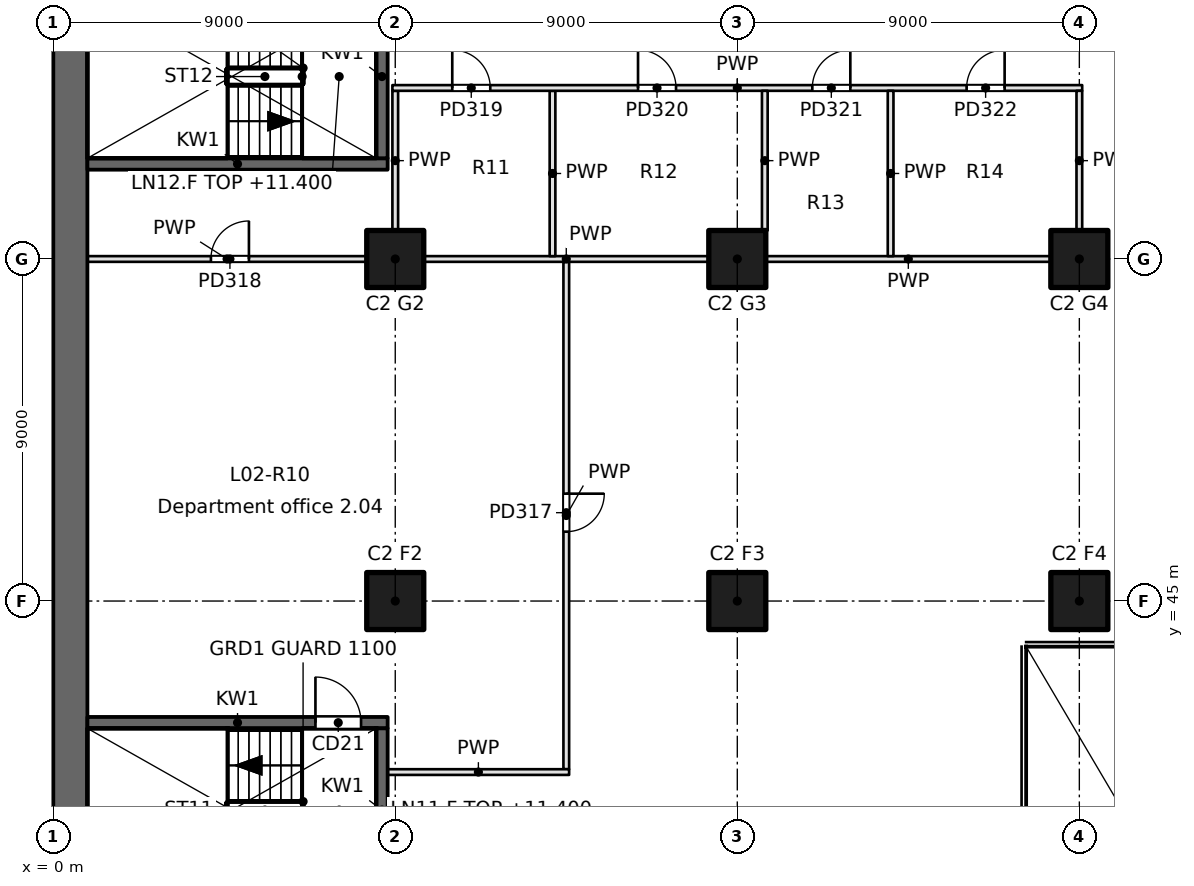
"""IFC4 building model, lengths in metres.
Left out: names, types, materials, properties, quantities, classifications, styles, units other than length and angle.
Written with IfcOpenShell. Run it as: python <this file> out.ifc"""

import sys

from ifc_helpers import new_model, si_unit, direction, frame, frame_2d, origin, origin_2d, place, context, subcontext, project, spatial, rectangle, extrude, element, fill, save


model = new_model("IFC4")
c1 = context("Model", 3, precision=1e-05, world=origin(), true_north=direction((0.0, 1.0)))
c2 = subcontext(c1, "Body", "Model", "MODEL_VIEW")
j1 = project(units=[si_unit("LENGTHUNIT", "METRE"), si_unit("PLANEANGLEUNIT", "RADIAN")], contexts=[c1])
p1 = place(None, origin())
s1 = spatial("IfcSite", under=j1, at=p1, CompositionType="ELEMENT")
p2 = place(p1, origin())
s2 = spatial("IfcBuilding", under=s1, at=p2, CompositionType="ELEMENT")
p3 = place(p2, frame((0.0, 0.0, 11.4)))
s3 = spatial("IfcBuildingStorey", under=s2, at=p3, CompositionType="ELEMENT", Elevation=11.4)
for number, where, z_axis, x_axis in (
    (1, (9.0, 45.0, 0.0), (0.0, 0.0, 1.0), (1.0, 0.0, 0.0)),
    (2, (9.0, 54.0, 0.0), (0.0, 0.0, 1.0), (1.0, 0.0, 0.0)),
    (3, (18.0, 45.0, 0.0), (0.0, 0.0, 1.0), (1.0, 0.0, 0.0)),
    (4, (18.0, 54.0, 0.0), (0.0, 0.0, 1.0), (1.0, 0.0, 0.0)),
    (5, (27.0, 45.0, 0.0), (0.0, 0.0, 1.0), (1.0, 0.0, 0.0)),
    (6, (27.0, 54.0, 0.0), (0.0, 0.0, 1.0), (1.0, 0.0, 0.0)),
):
    element("IfcColumn", number, at=place(p3, frame(where, z_axis=z_axis, x_axis=x_axis)), inside=s3, PredefinedType="COLUMN", context=c2, shape_type="SweptSolid", body=[
        extrude(rectangle(XDim=1.5, YDim=1.5, at=origin_2d()), origin(), (0.0, 0.0, 1.0), 5.4),
    ])
p4 = place(p3, frame((0.45, 94.5, 0.0), z_axis=(0.0, 0.0, 1.0), x_axis=(0.0, -1.0, 0.0)))
e7 = element("IfcWall", 7, at=p4, inside=s3, PredefinedType="SHEAR", context=c2, shape_type="SweptSolid", body=[
    extrude(rectangle(XDim=66.085, YDim=0.9, at=frame_2d((33.042, 0.0))), origin(), (0.0, 0.0, 1.0), 5.4),
])
p5 = place(p3, frame((0.9, 41.8, -0.35), z_axis=(0.0, 0.0, 1.0), x_axis=(1.0, 0.0, 0.0)))
e8 = element("IfcWall", 8, at=p5, inside=s3, PredefinedType="SOLIDWALL", context=c2, shape_type="SweptSolid", body=[
    extrude(rectangle(XDim=7.9, YDim=0.3, at=frame_2d((3.95, 0.0))), origin(), (0.0, 0.0, 1.0), 5.4),
])
p6 = place(p5, frame((6.0, 0.0, 0.35)))
e9 = element("IfcOpeningElement", 9, at=p6, cuts=e8, PredefinedType="OPENING", context=c2, shape_type="SweptSolid", body=[
    extrude(rectangle(XDim=1.2, YDim=2.1, at=frame_2d((0.6, 1.05))), frame((0.0, 0.15, 0.0), z_axis=(0.0, -1.0, 0.0), x_axis=(1.0, 0.0, 0.0)), (0.0, 0.0, 1.0), 0.3),
])
p7 = place(p3, frame((0.9, 56.5, -0.35), z_axis=(0.0, 0.0, 1.0), x_axis=(1.0, 0.0, 0.0)))
e10 = element("IfcWall", 10, at=p7, inside=s3, PredefinedType="SOLIDWALL", context=c2, shape_type="SweptSolid", body=[
    extrude(rectangle(XDim=7.9, YDim=0.3, at=frame_2d((3.95, 0.0))), origin(), (0.0, 0.0, 1.0), 5.4),
])
p8 = place(p3, frame((8.65, 37.35, -0.35), z_axis=(0.0, 0.0, 1.0), x_axis=(0.0, 1.0, 0.0)))
e11 = element("IfcWall", 11, at=p8, inside=s3, PredefinedType="SOLIDWALL", context=c2, shape_type="SweptSolid", body=[
    extrude(rectangle(XDim=4.3, YDim=0.3, at=frame_2d((2.15, 0.0))), origin(), (0.0, 0.0, 1.0), 5.4),
])
p9 = place(p3, frame((8.65, 56.65, -0.35), z_axis=(0.0, 0.0, 1.0), x_axis=(0.0, 1.0, 0.0)))
e12 = element("IfcWall", 12, at=p9, inside=s3, PredefinedType="SOLIDWALL", context=c2, shape_type="SweptSolid", body=[
    extrude(rectangle(XDim=4.3, YDim=0.3, at=frame_2d((2.15, 0.0))), origin(), (0.0, 0.0, 1.0), 5.4),
])
p10 = place(p3, frame((0.9, 54.0, 0.0), z_axis=(0.0, 0.0, 1.0), x_axis=(1.0, 0.0, 0.0)))
e13 = element("IfcWall", 13, at=p10, inside=s3, PredefinedType="PARTITIONING", context=c2, shape_type="SweptSolid", body=[
    extrude(rectangle(XDim=7.35, YDim=0.15, at=frame_2d((3.675, 0.0))), origin(), (0.0, 0.0, 1.0), 5.05),
])
p11 = place(p10, frame((3.25, 0.0, 0.0)))
e14 = element("IfcOpeningElement", 14, at=p11, cuts=e13, PredefinedType="OPENING", context=c2, shape_type="SweptSolid", body=[
    extrude(rectangle(XDim=1.0, YDim=2.1, at=frame_2d((0.5, 1.05))), frame((0.0, 0.075, 0.0), z_axis=(0.0, -1.0, 0.0), x_axis=(1.0, 0.0, 0.0)), (0.0, 0.0, 1.0), 0.15),
])
for number, where, z_axis, x_axis in (
    (15, (9.75, 54.0, 0.0), (0.0, 0.0, 1.0), (1.0, 0.0, 0.0)),
    (16, (26.25, 54.0, 0.0), (0.0, 0.0, 1.0), (-1.0, 0.0, 0.0)),
):
    element("IfcWall", number, at=place(p3, frame(where, z_axis=z_axis, x_axis=x_axis)), inside=s3, PredefinedType="PARTITIONING", context=c2, shape_type="SweptSolid", body=[
        extrude(rectangle(XDim=7.5, YDim=0.15, at=frame_2d((3.75, 0.0))), origin(), (0.0, 0.0, 1.0), 5.05),
    ])
p12 = place(p3, frame((13.5, 53.925, 0.0), z_axis=(0.0, 0.0, 1.0), x_axis=(0.0, -1.0, 0.0)))
e17 = element("IfcWall", 17, at=p12, inside=s3, PredefinedType="PARTITIONING", context=c2, shape_type="SweptSolid", body=[
    extrude(rectangle(XDim=13.35, YDim=0.15, at=frame_2d((6.675, 0.0))), origin(), (0.0, 0.0, 1.0), 5.05),
])
p13 = place(p12, frame((6.1, 0.0, 0.0)))
e18 = element("IfcOpeningElement", 18, at=p13, cuts=e17, PredefinedType="OPENING", context=c2, shape_type="SweptSolid", body=[
    extrude(rectangle(XDim=1.0, YDim=2.1, at=frame_2d((0.5, 1.05))), frame((0.0, 0.075, 0.0), z_axis=(0.0, -1.0, 0.0), x_axis=(1.0, 0.0, 0.0)), (0.0, 0.0, 1.0), 0.15),
])
p14 = place(p3, frame((13.575, 40.5, 0.0), z_axis=(0.0, 0.0, 1.0), x_axis=(-1.0, 0.0, 0.0)))
e19 = element("IfcWall", 19, at=p14, inside=s3, PredefinedType="PARTITIONING", context=c2, shape_type="SweptSolid", body=[
    extrude(rectangle(XDim=4.775, YDim=0.15, at=frame_2d((2.387, 0.0))), origin(), (0.0, 0.0, 1.0), 5.05),
])
p15 = place(p3, frame((13.138, 54.075, 0.0), z_axis=(0.0, 0.0, 1.0), x_axis=(0.0, 1.0, 0.0)))
e20 = element("IfcWall", 20, at=p15, inside=s3, PredefinedType="PARTITIONING", context=c2, shape_type="SweptSolid", body=[
    extrude(rectangle(XDim=4.35, YDim=0.15, at=frame_2d((2.175, 0.0))), origin(), (0.0, 0.0, 1.0), 5.05),
])
p16 = place(p3, frame((9.0, 54.75, 0.0), z_axis=(0.0, 0.0, 1.0), x_axis=(0.0, 1.0, 0.0)))
e21 = element("IfcWall", 21, at=p16, inside=s3, PredefinedType="PARTITIONING", context=c2, shape_type="SweptSolid", body=[
    extrude(rectangle(XDim=3.675, YDim=0.15, at=frame_2d((1.837, 0.0))), origin(), (0.0, 0.0, 1.0), 5.05),
])
p17 = place(p3, frame((8.925, 58.5, 0.0), z_axis=(0.0, 0.0, 1.0), x_axis=(1.0, 0.0, 0.0)))
e22 = element("IfcWall", 22, at=p17, inside=s3, PredefinedType="PARTITIONING", context=c2, shape_type="SweptSolid", body=[
    extrude(rectangle(XDim=18.15, YDim=0.15, at=frame_2d((9.075, 0.0))), origin(), (0.0, 0.0, 1.0), 5.05),
])
p18 = place(p17, frame((1.575, 0.0, 0.0)))
e23 = element("IfcOpeningElement", 23, at=p18, cuts=e22, PredefinedType="OPENING", context=c2, shape_type="SweptSolid", body=[
    extrude(rectangle(XDim=1.0, YDim=2.1, at=frame_2d((0.5, 1.05))), frame((0.0, 0.075, 0.0), z_axis=(0.0, -1.0, 0.0), x_axis=(1.0, 0.0, 0.0)), (0.0, 0.0, 1.0), 0.15),
])
p19 = place(p17, frame((6.463, 0.0, 0.0)))
e24 = element("IfcOpeningElement", 24, at=p19, cuts=e22, PredefinedType="OPENING", context=c2, shape_type="SweptSolid", body=[
    extrude(rectangle(XDim=1.0, YDim=2.1, at=frame_2d((0.5, 1.05))), frame((0.0, 0.075, 0.0), z_axis=(0.0, -1.0, 0.0), x_axis=(1.0, 0.0, 0.0)), (0.0, 0.0, 1.0), 0.15),
])
p20 = place(p17, frame((11.049, 0.0, 0.0)))
e25 = element("IfcOpeningElement", 25, at=p20, cuts=e22, PredefinedType="OPENING", context=c2, shape_type="SweptSolid", body=[
    extrude(rectangle(XDim=1.0, YDim=2.1, at=frame_2d((0.5, 1.05))), frame((0.0, 0.075, 0.0), z_axis=(0.0, -1.0, 0.0), x_axis=(1.0, 0.0, 0.0)), (0.0, 0.0, 1.0), 0.15),
])
p21 = place(p17, frame((15.109, 0.0, 0.0)))
e26 = element("IfcOpeningElement", 26, at=p21, cuts=e22, PredefinedType="OPENING", context=c2, shape_type="SweptSolid", body=[
    extrude(rectangle(XDim=1.0, YDim=2.1, at=frame_2d((0.5, 1.05))), frame((0.0, 0.075, 0.0), z_axis=(0.0, -1.0, 0.0), x_axis=(1.0, 0.0, 0.0)), (0.0, 0.0, 1.0), 0.15),
])
p22 = place(p3, frame((18.724, 54.75, 0.0), z_axis=(0.0, 0.0, 1.0), x_axis=(0.0, 1.0, 0.0)))
e27 = element("IfcWall", 27, at=p22, inside=s3, PredefinedType="PARTITIONING", context=c2, shape_type="SweptSolid", body=[
    extrude(rectangle(XDim=3.675, YDim=0.15, at=frame_2d((1.837, 0.0))), origin(), (0.0, 0.0, 1.0), 5.05),
])
p23 = place(p3, frame((22.034, 54.075, 0.0), z_axis=(0.0, 0.0, 1.0), x_axis=(0.0, 1.0, 0.0)))
e28 = element("IfcWall", 28, at=p23, inside=s3, PredefinedType="PARTITIONING", context=c2, shape_type="SweptSolid", body=[
    extrude(rectangle(XDim=4.35, YDim=0.15, at=frame_2d((2.175, 0.0))), origin(), (0.0, 0.0, 1.0), 5.05),
])
p24 = place(p3, frame((27.0, 58.425, 0.0), z_axis=(0.0, 0.0, 1.0), x_axis=(0.0, -1.0, 0.0)))
e29 = element("IfcWall", 29, at=p24, inside=s3, PredefinedType="PARTITIONING", context=c2, shape_type="SweptSolid", body=[
    extrude(rectangle(XDim=3.675, YDim=0.15, at=frame_2d((1.837, 0.0))), origin(), (0.0, 0.0, 1.0), 5.05),
])
p25 = place(p6, origin())
e30 = element("IfcDoor", 30, at=p25, inside=s3, OperationType="SINGLE_SWING_LEFT", PredefinedType="DOOR", context=c2, shape_type="SweptSolid", body=[
    extrude(rectangle(XDim=1.2, YDim=2.1, at=frame_2d((0.6, 1.05))), frame((0.0, 0.025, 0.0), z_axis=(0.0, -1.0, 0.0), x_axis=(1.0, 0.0, 0.0)), (0.0, 0.0, 1.0), 0.05),
])
fill(e9, e30)
p26 = place(p13, origin())
e31 = element("IfcDoor", 31, at=p26, inside=s3, OperationType="SINGLE_SWING_LEFT", PredefinedType="DOOR", context=c2, shape_type="SweptSolid", body=[
    extrude(rectangle(XDim=1.0, YDim=2.1, at=frame_2d((0.5, 1.05))), frame((0.0, 0.025, 0.0), z_axis=(0.0, -1.0, 0.0), x_axis=(1.0, 0.0, 0.0)), (0.0, 0.0, 1.0), 0.05),
])
fill(e18, e31)
p27 = place(p11, origin())
e32 = element("IfcDoor", 32, at=p27, inside=s3, OperationType="SINGLE_SWING_RIGHT", PredefinedType="DOOR", context=c2, shape_type="SweptSolid", body=[
    extrude(rectangle(XDim=1.0, YDim=2.1, at=frame_2d((0.5, 1.05))), frame((0.0, 0.025, 0.0), z_axis=(0.0, -1.0, 0.0), x_axis=(1.0, 0.0, 0.0)), (0.0, 0.0, 1.0), 0.05),
])
fill(e14, e32)
p28 = place(p18, origin())
e33 = element("IfcDoor", 33, at=p28, inside=s3, OperationType="SINGLE_SWING_LEFT", PredefinedType="DOOR", context=c2, shape_type="SweptSolid", body=[
    extrude(rectangle(XDim=1.0, YDim=2.1, at=frame_2d((0.5, 1.05))), frame((0.0, 0.025, 0.0), z_axis=(0.0, -1.0, 0.0), x_axis=(1.0, 0.0, 0.0)), (0.0, 0.0, 1.0), 0.05),
])
fill(e23, e33)
p29 = place(p19, origin())
e34 = element("IfcDoor", 34, at=p29, inside=s3, OperationType="SINGLE_SWING_LEFT", PredefinedType="DOOR", context=c2, shape_type="SweptSolid", body=[
    extrude(rectangle(XDim=1.0, YDim=2.1, at=frame_2d((0.5, 1.05))), frame((0.0, 0.025, 0.0), z_axis=(0.0, -1.0, 0.0), x_axis=(1.0, 0.0, 0.0)), (0.0, 0.0, 1.0), 0.05),
])
fill(e24, e34)
p30 = place(p20, origin())
e35 = element("IfcDoor", 35, at=p30, inside=s3, OperationType="SINGLE_SWING_RIGHT", PredefinedType="DOOR", context=c2, shape_type="SweptSolid", body=[
    extrude(rectangle(XDim=1.0, YDim=2.1, at=frame_2d((0.5, 1.05))), frame((0.0, 0.025, 0.0), z_axis=(0.0, -1.0, 0.0), x_axis=(1.0, 0.0, 0.0)), (0.0, 0.0, 1.0), 0.05),
])
fill(e25, e35)
p31 = place(p21, origin())
e36 = element("IfcDoor", 36, at=p31, inside=s3, OperationType="SINGLE_SWING_RIGHT", PredefinedType="DOOR", context=c2, shape_type="SweptSolid", body=[
    extrude(rectangle(XDim=1.0, YDim=2.1, at=frame_2d((0.5, 1.05))), frame((0.0, 0.025, 0.0), z_axis=(0.0, -1.0, 0.0), x_axis=(1.0, 0.0, 0.0)), (0.0, 0.0, 1.0), 0.05),
])
fill(e26, e36)
save(model, sys.argv[1])
